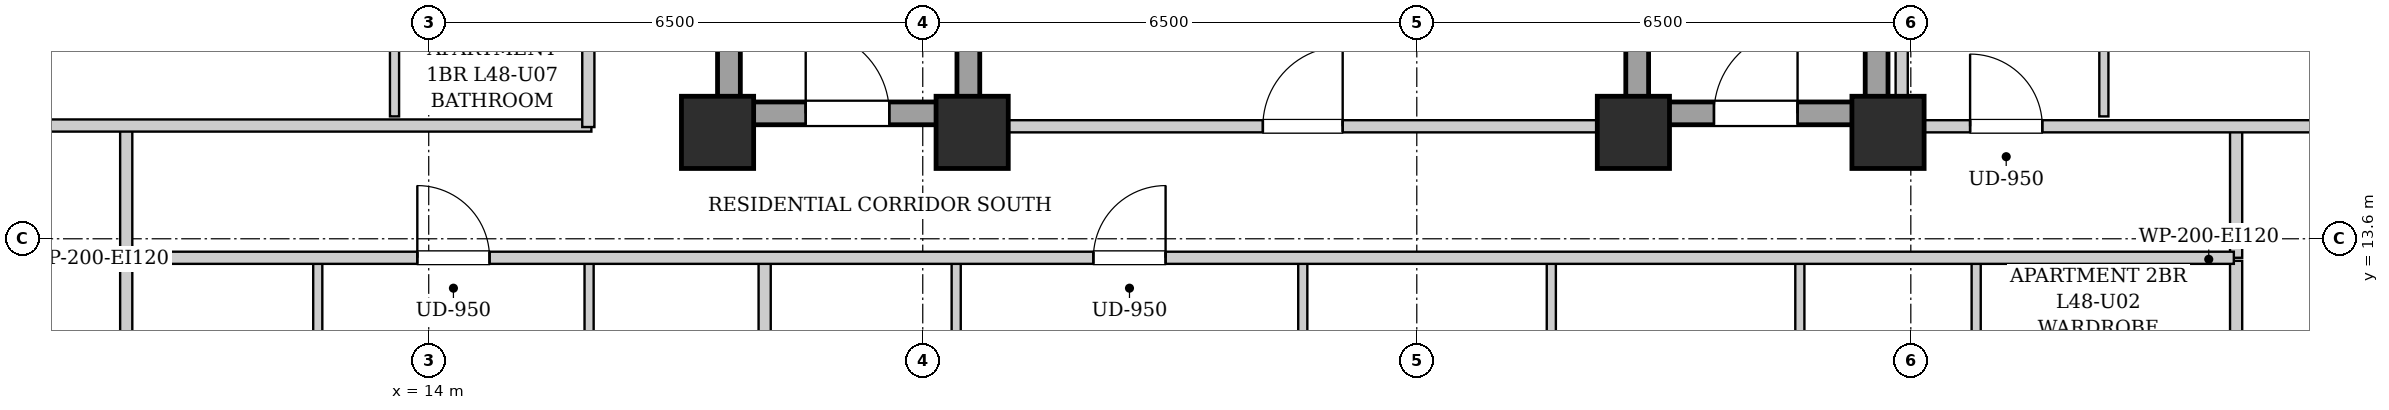
"""IFC4 building model, lengths in metres.
Left out: names, types, materials, properties, quantities, classifications, styles, units other than length and angle.
Written with IfcOpenShell. Run it as: python <this file> out.ifc"""

import sys

from ifc_helpers import new_model, si_unit, direction, frame, frame_2d, origin, origin_2d, place, context, subcontext, project, spatial, rectangle, extrude, element, fill, save


model = new_model("IFC4")
c1 = context("Model", 3, precision=1e-05, world=origin(), true_north=direction((0.0, 1.0)))
c2 = subcontext(c1, "Body", "Model", "MODEL_VIEW")
j1 = project(units=[si_unit("LENGTHUNIT", "METRE"), si_unit("PLANEANGLEUNIT", "RADIAN")], contexts=[c1])
p1 = place(None, origin())
s1 = spatial("IfcSite", under=j1, at=p1, CompositionType="ELEMENT")
p2 = place(p1, origin())
s2 = spatial("IfcBuilding", under=s1, at=p2, CompositionType="ELEMENT")
p3 = place(p2, frame((0.0, 0.0, 166.65)))
s3 = spatial("IfcBuildingStorey", under=s2, at=p3, CompositionType="ELEMENT", Elevation=166.65)
for number, where, z_axis, x_axis in (
    (1, (17.8, 15.0, 0.0), (0.0, 0.0, 1.0), (1.0, 0.0, 0.0)),
    (2, (21.15, 15.0, 0.0), (0.0, 0.0, 1.0), (1.0, 0.0, 0.0)),
    (3, (29.85, 15.0, 0.0), (0.0, 0.0, 1.0), (1.0, 0.0, 0.0)),
    (4, (33.2, 15.0, 0.0), (0.0, 0.0, 1.0), (1.0, 0.0, 0.0)),
):
    element("IfcColumn", number, at=place(p3, frame(where, z_axis=z_axis, x_axis=x_axis)), inside=s3, PredefinedType="COLUMN", context=c2, shape_type="SweptSolid", body=[
        extrude(rectangle(XDim=0.95, YDim=0.95, at=origin_2d()), origin(), (0.0, 0.0, 1.0), 3.25),
    ])
for number, where, z_axis, x_axis in (
    (5, (17.95, 15.1, 0.0), (0.0, 0.0, 1.0), (0.0, 1.0, 0.0)),
    (6, (21.1, 15.1, 0.0), (0.0, 0.0, 1.0), (0.0, 1.0, 0.0)),
):
    element("IfcWall", number, at=place(p3, frame(where, z_axis=z_axis, x_axis=x_axis)), inside=s3, PredefinedType="SHEAR", context=c2, shape_type="SweptSolid", body=[
        extrude(rectangle(XDim=9.0, YDim=0.3, at=frame_2d((4.5, 0.0))), origin(), (0.0, 0.0, 1.0), 2.93),
    ])
p4 = place(p3, frame((18.1, 15.25, 0.0), z_axis=(0.0, 0.0, 1.0), x_axis=(1.0, 0.0, 0.0)))
e7 = element("IfcWall", 7, at=p4, inside=s3, PredefinedType="SHEAR", context=c2, shape_type="SweptSolid", body=[
    extrude(rectangle(XDim=2.85, YDim=0.3, at=frame_2d((1.425, 0.0))), origin(), (0.0, 0.0, 1.0), 2.93),
])
p5 = place(p4, frame((0.86, 0.0, 0.0)))
e8 = element("IfcOpeningElement", 8, at=p5, cuts=e7, PredefinedType="OPENING", context=c2, shape_type="SweptSolid", body=[
    extrude(rectangle(XDim=1.1, YDim=2.05, at=frame_2d((0.55, 1.025))), frame((0.0, 0.16, 0.0), z_axis=(0.0, -1.0, 0.0), x_axis=(1.0, 0.0, 0.0)), (0.0, 0.0, 1.0), 0.32),
])
for number, where, z_axis, x_axis in (
    (9, (29.9, 15.1, 0.0), (0.0, 0.0, 1.0), (0.0, 1.0, 0.0)),
    (10, (33.05, 15.1, 0.0), (0.0, 0.0, 1.0), (0.0, 1.0, 0.0)),
):
    element("IfcWall", number, at=place(p3, frame(where, z_axis=z_axis, x_axis=x_axis)), inside=s3, PredefinedType="SHEAR", context=c2, shape_type="SweptSolid", body=[
        extrude(rectangle(XDim=9.0, YDim=0.3, at=frame_2d((4.5, 0.0))), origin(), (0.0, 0.0, 1.0), 2.93),
    ])
p6 = place(p3, frame((30.05, 15.25, 0.0), z_axis=(0.0, 0.0, 1.0), x_axis=(1.0, 0.0, 0.0)))
e11 = element("IfcWall", 11, at=p6, inside=s3, PredefinedType="SHEAR", context=c2, shape_type="SweptSolid", body=[
    extrude(rectangle(XDim=2.85, YDim=0.3, at=frame_2d((1.425, 0.0))), origin(), (0.0, 0.0, 1.0), 2.93),
])
p7 = place(p6, frame((0.86, 0.0, 0.0)))
e12 = element("IfcOpeningElement", 12, at=p7, cuts=e11, PredefinedType="OPENING", context=c2, shape_type="SweptSolid", body=[
    extrude(rectangle(XDim=1.1, YDim=2.05, at=frame_2d((0.55, 1.025))), frame((0.0, 0.16, 0.0), z_axis=(0.0, -1.0, 0.0), x_axis=(1.0, 0.0, 0.0)), (0.0, 0.0, 1.0), 0.32),
])
p8 = place(p3, frame((21.25, 15.08, 0.0), z_axis=(0.0, 0.0, 1.0), x_axis=(1.0, 0.0, 0.0)))
e13 = element("IfcWall", 13, at=p8, inside=s3, PredefinedType="PARTITIONING", context=c2, shape_type="SweptSolid", body=[
    extrude(rectangle(XDim=8.5, YDim=0.16, at=frame_2d((4.25, 0.0))), origin(), (0.0, 0.0, 1.0), 2.382),
])
p9 = place(p8, frame((3.725, 0.0, 0.0)))
e14 = element("IfcOpeningElement", 14, at=p9, cuts=e13, PredefinedType="OPENING", context=c2, shape_type="SweptSolid", body=[
    extrude(rectangle(XDim=1.05, YDim=2.05, at=frame_2d((0.525, 1.025))), frame((0.0, 0.09, 0.0), z_axis=(0.0, -1.0, 0.0), x_axis=(1.0, 0.0, 0.0)), (0.0, 0.0, 1.0), 0.18),
])
for number, where, z_axis, x_axis in (
    (15, (10.02, 13.35, 0.0), (0.0, 0.0, 1.0), (0.0, 1.0, 0.0)),
    (16, (37.78, 13.35, 0.0), (0.0, 0.0, 1.0), (0.0, 1.0, 0.0)),
):
    element("IfcWall", number, at=place(p3, frame(where, z_axis=z_axis, x_axis=x_axis)), inside=s3, PredefinedType="PARTITIONING", context=c2, shape_type="SweptSolid", body=[
        extrude(rectangle(XDim=1.74, YDim=0.16, at=frame_2d((0.87, 0.0))), origin(), (0.0, 0.0, 1.0), 2.93),
    ])
p10 = place(p3, frame((7.78, 15.09, 0.0), z_axis=(0.0, 0.0, 1.0), x_axis=(1.0, 0.0, 0.0)))
e17 = element("IfcWall", 17, at=p10, inside=s3, PredefinedType="PARTITIONING", context=c2, shape_type="SweptSolid", body=[
    extrude(rectangle(XDim=8.36, YDim=0.16, at=frame_2d((4.18, 0.0))), origin(), (0.0, 0.0, 1.0), 2.382),
])
p11 = place(p3, frame((10.02, 10.4, 0.0), z_axis=(0.0, 0.0, 1.0), x_axis=(0.0, 1.0, 0.0)))
e18 = element("IfcWall", 18, at=p11, inside=s3, PredefinedType="PARTITIONING", context=c2, shape_type="SweptSolid", body=[
    extrude(rectangle(XDim=2.91, YDim=0.16, at=frame_2d((1.455, 0.0))), origin(), (0.0, 0.0, 1.0), 2.93),
])
p12 = place(p3, frame((12.54, 10.46, 0.0), z_axis=(0.0, 0.0, 1.0), x_axis=(0.0, 1.0, 0.0)))
e19 = element("IfcWall", 19, at=p12, inside=s3, PredefinedType="PARTITIONING", context=c2, shape_type="SweptSolid", body=[
    extrude(rectangle(XDim=2.85, YDim=0.12, at=frame_2d((1.425, 0.0))), origin(), (0.0, 0.0, 1.0), 2.93),
])
p13 = place(p12, frame((0.995, 0.0, 0.0)))
e20 = element("IfcOpeningElement", 20, at=p13, cuts=e19, PredefinedType="OPENING", context=c2, shape_type="SweptSolid", body=[
    extrude(rectangle(XDim=0.86, YDim=2.05, at=frame_2d((0.43, 1.025))), frame((0.0, 0.07, 0.0), z_axis=(0.0, -1.0, 0.0), x_axis=(1.0, 0.0, 0.0)), (0.0, 0.0, 1.0), 0.14),
])
p14 = place(p3, frame((16.11, 10.46, 0.0), z_axis=(0.0, 0.0, 1.0), x_axis=(0.0, 1.0, 0.0)))
e21 = element("IfcWall", 21, at=p14, inside=s3, PredefinedType="PARTITIONING", context=c2, shape_type="SweptSolid", body=[
    extrude(rectangle(XDim=2.85, YDim=0.12, at=frame_2d((1.425, 0.0))), origin(), (0.0, 0.0, 1.0), 2.93),
])
p15 = place(p14, frame((0.975, 0.0, 0.0)))
e22 = element("IfcOpeningElement", 22, at=p15, cuts=e21, PredefinedType="OPENING", context=c2, shape_type="SweptSolid", body=[
    extrude(rectangle(XDim=0.9, YDim=2.05, at=frame_2d((0.45, 1.025))), frame((0.0, 0.07, 0.0), z_axis=(0.0, -1.0, 0.0), x_axis=(1.0, 0.0, 0.0)), (0.0, 0.0, 1.0), 0.14),
])
p16 = place(p3, frame((37.78, 10.4, 0.0), z_axis=(0.0, 0.0, 1.0), x_axis=(0.0, 1.0, 0.0)))
e23 = element("IfcWall", 23, at=p16, inside=s3, PredefinedType="PARTITIONING", context=c2, shape_type="SweptSolid", body=[
    extrude(rectangle(XDim=2.91, YDim=0.16, at=frame_2d((1.455, 0.0))), origin(), (0.0, 0.0, 1.0), 2.93),
])
p17 = place(p3, frame((18.42, 4.08, 0.0), z_axis=(0.0, 0.0, 1.0), x_axis=(0.0, 1.0, 0.0)))
e24 = element("IfcWall", 24, at=p17, inside=s3, PredefinedType="PARTITIONING", context=c2, shape_type="SweptSolid", body=[
    extrude(rectangle(XDim=9.23, YDim=0.16, at=frame_2d((4.615, 0.0))), origin(), (0.0, 0.0, 1.0), 2.93),
])
p18 = place(p3, frame((20.94, 10.46, 0.0), z_axis=(0.0, 0.0, 1.0), x_axis=(0.0, 1.0, 0.0)))
e25 = element("IfcWall", 25, at=p18, inside=s3, PredefinedType="PARTITIONING", context=c2, shape_type="SweptSolid", body=[
    extrude(rectangle(XDim=2.85, YDim=0.12, at=frame_2d((1.425, 0.0))), origin(), (0.0, 0.0, 1.0), 2.93),
])
p19 = place(p18, frame((0.995, 0.0, 0.0)))
e26 = element("IfcOpeningElement", 26, at=p19, cuts=e25, PredefinedType="OPENING", context=c2, shape_type="SweptSolid", body=[
    extrude(rectangle(XDim=0.86, YDim=2.05, at=frame_2d((0.43, 1.025))), frame((0.0, 0.07, 0.0), z_axis=(0.0, -1.0, 0.0), x_axis=(1.0, 0.0, 0.0)), (0.0, 0.0, 1.0), 0.14),
])
p20 = place(p3, frame((25.5, 10.46, 0.0), z_axis=(0.0, 0.0, 1.0), x_axis=(0.0, 1.0, 0.0)))
e27 = element("IfcWall", 27, at=p20, inside=s3, PredefinedType="PARTITIONING", context=c2, shape_type="SweptSolid", body=[
    extrude(rectangle(XDim=2.85, YDim=0.12, at=frame_2d((1.425, 0.0))), origin(), (0.0, 0.0, 1.0), 2.93),
])
p21 = place(p20, frame((0.975, 0.0, 0.0)))
e28 = element("IfcOpeningElement", 28, at=p21, cuts=e27, PredefinedType="OPENING", context=c2, shape_type="SweptSolid", body=[
    extrude(rectangle(XDim=0.9, YDim=2.05, at=frame_2d((0.45, 1.025))), frame((0.0, 0.07, 0.0), z_axis=(0.0, -1.0, 0.0), x_axis=(1.0, 0.0, 0.0)), (0.0, 0.0, 1.0), 0.14),
])
p22 = place(p3, frame((28.77, 10.46, 0.0), z_axis=(0.0, 0.0, 1.0), x_axis=(0.0, 1.0, 0.0)))
e29 = element("IfcWall", 29, at=p22, inside=s3, PredefinedType="PARTITIONING", context=c2, shape_type="SweptSolid", body=[
    extrude(rectangle(XDim=2.85, YDim=0.12, at=frame_2d((1.425, 0.0))), origin(), (0.0, 0.0, 1.0), 2.93),
])
p23 = place(p22, frame((0.975, 0.0, 0.0)))
e30 = element("IfcOpeningElement", 30, at=p23, cuts=e29, PredefinedType="OPENING", context=c2, shape_type="SweptSolid", body=[
    extrude(rectangle(XDim=0.9, YDim=2.05, at=frame_2d((0.45, 1.025))), frame((0.0, 0.07, 0.0), z_axis=(0.0, -1.0, 0.0), x_axis=(1.0, 0.0, 0.0)), (0.0, 0.0, 1.0), 0.14),
])
p24 = place(p3, frame((32.04, 10.46, 0.0), z_axis=(0.0, 0.0, 1.0), x_axis=(0.0, 1.0, 0.0)))
e31 = element("IfcWall", 31, at=p24, inside=s3, PredefinedType="PARTITIONING", context=c2, shape_type="SweptSolid", body=[
    extrude(rectangle(XDim=2.85, YDim=0.12, at=frame_2d((1.425, 0.0))), origin(), (0.0, 0.0, 1.0), 2.93),
])
p25 = place(p24, frame((0.975, 0.0, 0.0)))
e32 = element("IfcOpeningElement", 32, at=p25, cuts=e31, PredefinedType="OPENING", context=c2, shape_type="SweptSolid", body=[
    extrude(rectangle(XDim=0.9, YDim=2.05, at=frame_2d((0.45, 1.025))), frame((0.0, 0.07, 0.0), z_axis=(0.0, -1.0, 0.0), x_axis=(1.0, 0.0, 0.0)), (0.0, 0.0, 1.0), 0.14),
])
p26 = place(p3, frame((34.36, 10.46, 0.0), z_axis=(0.0, 0.0, 1.0), x_axis=(0.0, 1.0, 0.0)))
e33 = element("IfcWall", 33, at=p26, inside=s3, PredefinedType="PARTITIONING", context=c2, shape_type="SweptSolid", body=[
    extrude(rectangle(XDim=2.85, YDim=0.12, at=frame_2d((1.425, 0.0))), origin(), (0.0, 0.0, 1.0), 2.93),
])
p27 = place(p26, frame((0.975, 0.0, 0.0)))
e34 = element("IfcOpeningElement", 34, at=p27, cuts=e33, PredefinedType="OPENING", context=c2, shape_type="SweptSolid", body=[
    extrude(rectangle(XDim=0.9, YDim=2.05, at=frame_2d((0.45, 1.025))), frame((0.0, 0.07, 0.0), z_axis=(0.0, -1.0, 0.0), x_axis=(1.0, 0.0, 0.0)), (0.0, 0.0, 1.0), 0.14),
])
p28 = place(p3, frame((13.55, 15.21, 0.0), z_axis=(0.0, 0.0, 1.0), x_axis=(0.0, 1.0, 0.0)))
e35 = element("IfcWall", 35, at=p28, inside=s3, PredefinedType="PARTITIONING", context=c2, shape_type="SweptSolid", body=[
    extrude(rectangle(XDim=2.159, YDim=0.12, at=frame_2d((1.08, 0.0))), origin(), (0.0, 0.0, 1.0), 2.93),
])
p29 = place(p3, frame((33.38, 15.08, 0.0), z_axis=(0.0, 0.0, 1.0), x_axis=(1.0, 0.0, 0.0)))
e36 = element("IfcWall", 36, at=p29, inside=s3, PredefinedType="PARTITIONING", context=c2, shape_type="SweptSolid", body=[
    extrude(rectangle(XDim=6.64, YDim=0.16, at=frame_2d((3.32, 0.0))), origin(), (0.0, 0.0, 1.0), 2.382),
])
p30 = place(p29, frame((0.9, 0.0, 0.0)))
e37 = element("IfcOpeningElement", 37, at=p30, cuts=e36, PredefinedType="OPENING", context=c2, shape_type="SweptSolid", body=[
    extrude(rectangle(XDim=0.95, YDim=2.1, at=frame_2d((0.475, 1.05))), frame((0.0, 0.09, 0.0), z_axis=(0.0, -1.0, 0.0), x_axis=(1.0, 0.0, 0.0)), (0.0, 0.0, 1.0), 0.18),
])
p31 = place(p3, frame((36.04, 15.21, 0.0), z_axis=(0.0, 0.0, 1.0), x_axis=(0.0, 1.0, 0.0)))
e38 = element("IfcWall", 38, at=p31, inside=s3, PredefinedType="PARTITIONING", context=c2, shape_type="SweptSolid", body=[
    extrude(rectangle(XDim=4.5, YDim=0.12, at=frame_2d((2.25, 0.0))), origin(), (0.0, 0.0, 1.0), 2.93),
])
p32 = place(p31, frame((1.8, 0.0, 0.0)))
e39 = element("IfcOpeningElement", 39, at=p32, cuts=e38, PredefinedType="OPENING", context=c2, shape_type="SweptSolid", body=[
    extrude(rectangle(XDim=0.9, YDim=2.05, at=frame_2d((0.45, 1.025))), frame((0.0, 0.07, 0.0), z_axis=(0.0, -1.0, 0.0), x_axis=(1.0, 0.0, 0.0)), (0.0, 0.0, 1.0), 0.14),
])
p33 = place(p3, frame((10.05, 13.35, 0.0), z_axis=(0.0, 0.0, 1.0), x_axis=(1.0, 0.0, 0.0)))
e40 = element("IfcWall", 40, at=p33, inside=s3, PredefinedType="PARTITIONING", context=c2, shape_type="SweptSolid", body=[
    extrude(rectangle(XDim=27.7, YDim=0.16, at=frame_2d((13.85, 0.0))), origin(), (0.0, 0.0, 1.0), 2.93),
])
p34 = place(p33, frame((3.8, 0.0, 0.0)))
e41 = element("IfcOpeningElement", 41, at=p34, cuts=e40, PredefinedType="OPENING", context=c2, shape_type="SweptSolid", body=[
    extrude(rectangle(XDim=0.95, YDim=2.1, at=frame_2d((0.475, 1.05))), frame((0.0, 0.09, 0.0), z_axis=(0.0, -1.0, 0.0), x_axis=(1.0, 0.0, 0.0)), (0.0, 0.0, 1.0), 0.18),
])
p35 = place(p33, frame((12.695, 0.0, 0.0)))
e42 = element("IfcOpeningElement", 42, at=p35, cuts=e40, PredefinedType="OPENING", context=c2, shape_type="SweptSolid", body=[
    extrude(rectangle(XDim=0.95, YDim=2.1, at=frame_2d((0.475, 1.05))), frame((0.0, 0.09, 0.0), z_axis=(0.0, -1.0, 0.0), x_axis=(1.0, 0.0, 0.0)), (0.0, 0.0, 1.0), 0.18),
])
p36 = place(p3, frame((16.1, 15.07, 0.0), z_axis=(0.0, 0.0, 1.0), x_axis=(0.0, 1.0, 0.0)))
e43 = element("IfcWall", 43, at=p36, inside=s3, PredefinedType="PARTITIONING", context=c2, shape_type="SweptSolid", body=[
    extrude(rectangle(XDim=13.93, YDim=0.16, at=frame_2d((6.965, 0.0))), origin(), (0.0, 0.0, 1.0), 2.93),
])
p37 = place(p36, frame((4.661, 0.0, 0.0)))
e44 = element("IfcOpeningElement", 44, at=p37, cuts=e43, PredefinedType="OPENING", context=c2, shape_type="SweptSolid", body=[
    extrude(rectangle(XDim=0.95, YDim=2.1, at=frame_2d((0.475, 1.05))), frame((0.0, 0.09, 0.0), z_axis=(0.0, -1.0, 0.0), x_axis=(1.0, 0.0, 0.0)), (0.0, 0.0, 1.0), 0.18),
])
p38 = place(p36, frame((11.411, 0.0, 0.0)))
e45 = element("IfcOpeningElement", 45, at=p38, cuts=e43, PredefinedType="OPENING", context=c2, shape_type="SweptSolid", body=[
    extrude(rectangle(XDim=0.95, YDim=2.1, at=frame_2d((0.475, 1.05))), frame((0.0, 0.09, 0.0), z_axis=(0.0, -1.0, 0.0), x_axis=(1.0, 0.0, 0.0)), (0.0, 0.0, 1.0), 0.18),
])
p39 = place(p3, frame((33.38, 15.02, 0.0), z_axis=(0.0, 0.0, 1.0), x_axis=(0.0, 1.0, 0.0)))
e46 = element("IfcWall", 46, at=p39, inside=s3, PredefinedType="PARTITIONING", context=c2, shape_type="SweptSolid", body=[
    extrude(rectangle(XDim=13.98, YDim=0.16, at=frame_2d((6.99, 0.0))), origin(), (0.0, 0.0, 1.0), 2.265),
])
p40 = place(p5, origin())
e47 = element("IfcDoor", 47, at=p40, inside=s3, OperationType="SINGLE_SWING_LEFT", PredefinedType="DOOR", context=c2, shape_type="SweptSolid", body=[
    extrude(rectangle(XDim=1.1, YDim=2.05, at=frame_2d((0.55, 1.025))), frame((0.0, 0.025, 0.0), z_axis=(0.0, -1.0, 0.0), x_axis=(1.0, 0.0, 0.0)), (0.0, 0.0, 1.0), 0.05),
])
fill(e8, e47)
p41 = place(p7, origin())
e48 = element("IfcDoor", 48, at=p41, inside=s3, OperationType="SINGLE_SWING_RIGHT", PredefinedType="DOOR", context=c2, shape_type="SweptSolid", body=[
    extrude(rectangle(XDim=1.1, YDim=2.05, at=frame_2d((0.55, 1.025))), frame((0.0, 0.025, 0.0), z_axis=(0.0, -1.0, 0.0), x_axis=(1.0, 0.0, 0.0)), (0.0, 0.0, 1.0), 0.05),
])
fill(e12, e48)
p42 = place(p9, origin())
e49 = element("IfcDoor", 49, at=p42, inside=s3, OperationType="SINGLE_SWING_RIGHT", PredefinedType="DOOR", context=c2, shape_type="SweptSolid", body=[
    extrude(rectangle(XDim=1.05, YDim=2.05, at=frame_2d((0.525, 1.025))), frame((0.0, 0.025, 0.0), z_axis=(0.0, -1.0, 0.0), x_axis=(1.0, 0.0, 0.0)), (0.0, 0.0, 1.0), 0.05),
])
fill(e14, e49)
p43 = place(p30, origin())
e50 = element("IfcDoor", 50, at=p43, inside=s3, OperationType="SINGLE_SWING_LEFT", PredefinedType="DOOR", context=c2, shape_type="SweptSolid", body=[
    extrude(rectangle(XDim=0.95, YDim=2.1, at=frame_2d((0.475, 1.05))), frame((0.0, 0.025, 0.0), z_axis=(0.0, -1.0, 0.0), x_axis=(1.0, 0.0, 0.0)), (0.0, 0.0, 1.0), 0.05),
])
fill(e37, e50)
p44 = place(p34, origin())
e51 = element("IfcDoor", 51, at=p44, inside=s3, OperationType="SINGLE_SWING_LEFT", PredefinedType="DOOR", context=c2, shape_type="SweptSolid", body=[
    extrude(rectangle(XDim=0.95, YDim=2.1, at=frame_2d((0.475, 1.05))), frame((0.0, 0.025, 0.0), z_axis=(0.0, -1.0, 0.0), x_axis=(1.0, 0.0, 0.0)), (0.0, 0.0, 1.0), 0.05),
])
fill(e41, e51)
p45 = place(p35, origin())
e52 = element("IfcDoor", 52, at=p45, inside=s3, OperationType="SINGLE_SWING_RIGHT", PredefinedType="DOOR", context=c2, shape_type="SweptSolid", body=[
    extrude(rectangle(XDim=0.95, YDim=2.1, at=frame_2d((0.475, 1.05))), frame((0.0, 0.025, 0.0), z_axis=(0.0, -1.0, 0.0), x_axis=(1.0, 0.0, 0.0)), (0.0, 0.0, 1.0), 0.05),
])
fill(e42, e52)
save(model, sys.argv[1])
